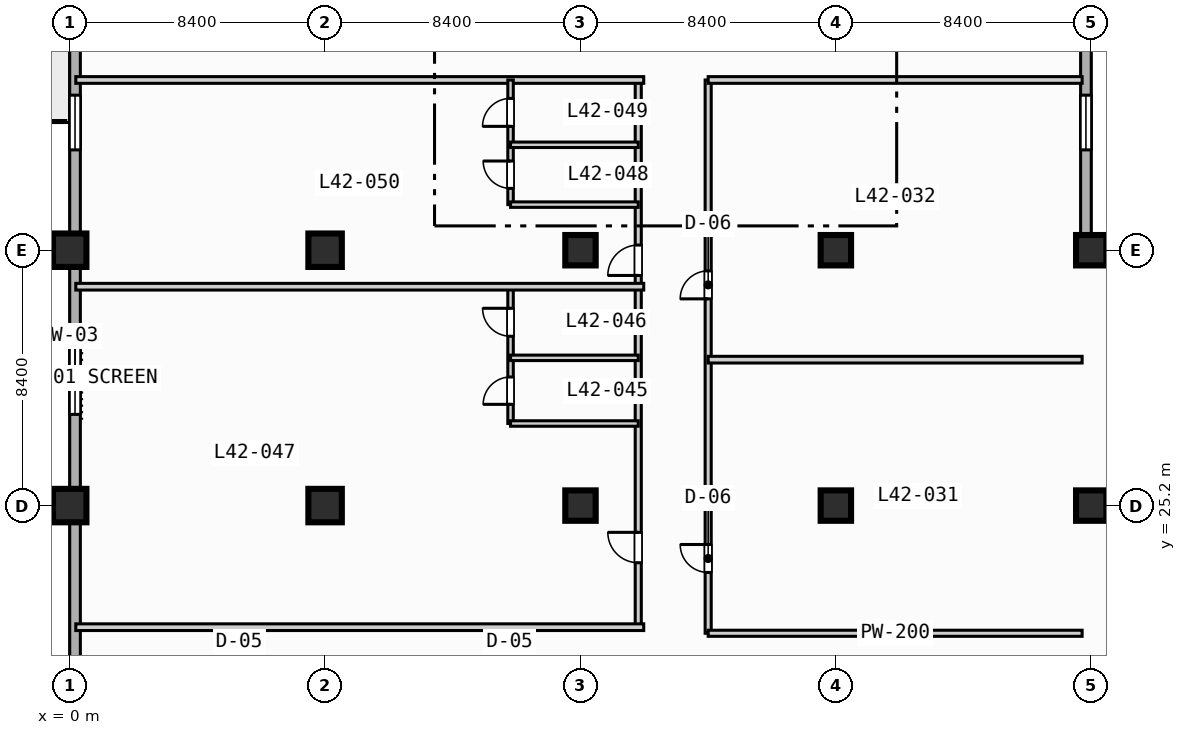
"""IFC4 building model, lengths in metres.
Left out: names, types, materials, properties, quantities, classifications, styles, units other than length and angle.
Written with IfcOpenShell. Run it as: python <this file> out.ifc"""

import sys

from ifc_helpers import new_model, si_unit, direction, frame, frame_2d, origin, origin_2d, place, context, subcontext, project, spatial, rectangle, extrude, element, fill, save


model = new_model("IFC4")
c1 = context("Model", 3, precision=1e-05, world=origin(), true_north=direction((0.0, 1.0)))
c2 = subcontext(c1, "Body", "Model", "MODEL_VIEW")
j1 = project(units=[si_unit("LENGTHUNIT", "METRE"), si_unit("PLANEANGLEUNIT", "RADIAN")], contexts=[c1])
p1 = place(None, origin())
s1 = spatial("IfcSite", under=j1, at=p1, CompositionType="ELEMENT")
p2 = place(p1, origin())
s2 = spatial("IfcBuilding", under=s1, at=p2, CompositionType="ELEMENT")
p3 = place(p2, frame((0.0, 0.0, 175.4)))
s3 = spatial("IfcBuildingStorey", under=s2, at=p3, CompositionType="ELEMENT", Elevation=175.4)
for number, where, z_axis, x_axis in (
    (1, (0.0, 25.2, 0.0), (0.0, 0.0, 1.0), (1.0, 0.0, 0.0)),
    (2, (0.0, 33.6, 0.0), (0.0, 0.0, 1.0), (1.0, 0.0, 0.0)),
    (3, (8.4, 25.2, 0.0), (0.0, 0.0, 1.0), (1.0, 0.0, 0.0)),
    (4, (8.4, 33.6, 0.0), (0.0, 0.0, 1.0), (1.0, 0.0, 0.0)),
):
    element("IfcColumn", number, at=place(p3, frame(where, z_axis=z_axis, x_axis=x_axis)), inside=s3, PredefinedType="COLUMN", context=c2, shape_type="SweptSolid", body=[
        extrude(rectangle(XDim=1.1, YDim=1.1, at=origin_2d()), origin(), (0.0, 0.0, 1.0), 3.7),
    ])
for number, where, z_axis, x_axis in (
    (5, (16.8, 25.2, 0.0), (0.0, 0.0, 1.0), (1.0, 0.0, 0.0)),
    (6, (16.8, 33.6, 0.0), (0.0, 0.0, 1.0), (1.0, 0.0, 0.0)),
    (7, (25.2, 25.2, 0.0), (0.0, 0.0, 1.0), (1.0, 0.0, 0.0)),
    (8, (25.2, 33.6, 0.0), (0.0, 0.0, 1.0), (1.0, 0.0, 0.0)),
    (9, (33.6, 25.2, 0.0), (0.0, 0.0, 1.0), (1.0, 0.0, 0.0)),
    (10, (33.6, 33.6, 0.0), (0.0, 0.0, 1.0), (1.0, 0.0, 0.0)),
):
    element("IfcColumn", number, at=place(p3, frame(where, z_axis=z_axis, x_axis=x_axis)), inside=s3, PredefinedType="COLUMN", context=c2, shape_type="SweptSolid", body=[
        extrude(rectangle(XDim=1.0, YDim=1.0, at=origin_2d()), origin(), (0.0, 0.0, 1.0), 3.7),
    ])
p4 = place(p3, frame((0.175, 3.175, 0.0), z_axis=(0.0, 0.0, 1.0), x_axis=(0.0, 1.0, 0.0)))
e11 = element("IfcWall", 11, at=p4, inside=s3, PredefinedType="STANDARD", context=c2, shape_type="SweptSolid", body=[
    extrude(rectangle(XDim=69.25, YDim=0.35, at=frame_2d((34.625, 0.0))), origin(), (0.0, 0.0, 1.0), 3.47),
])
p5 = place(p4, frame((42.325, 0.0, 0.0)))
e12 = element("IfcOpeningElement", 12, at=p5, cuts=e11, PredefinedType="OPENING", context=c2, shape_type="SweptSolid", body=[
    extrude(rectangle(XDim=1.4, YDim=2.2, at=frame_2d((0.7, 1.1))), frame((0.0, 0.185, 0.0), z_axis=(0.0, -1.0, 0.0), x_axis=(1.0, 0.0, 0.0)), (0.0, 0.0, 1.0), 0.37),
])
p6 = place(p4, frame((25.025, 0.0, 0.85)))
e13 = element("IfcOpeningElement", 13, at=p6, cuts=e11, PredefinedType="OPENING", context=c2, shape_type="SweptSolid", body=[
    extrude(rectangle(XDim=2.4, YDim=1.95, at=frame_2d((1.2, 0.975))), frame((0.0, 0.185, 0.0), z_axis=(0.0, -1.0, 0.0), x_axis=(1.0, 0.0, 0.0)), (0.0, 0.0, 1.0), 0.37),
])
p7 = place(p4, frame((33.725, 0.0, 0.85)))
e14 = element("IfcOpeningElement", 14, at=p7, cuts=e11, PredefinedType="OPENING", context=c2, shape_type="SweptSolid", body=[
    extrude(rectangle(XDim=1.8, YDim=1.8, at=frame_2d((0.9, 0.9))), frame((0.0, 0.185, 0.0), z_axis=(0.0, -1.0, 0.0), x_axis=(1.0, 0.0, 0.0)), (0.0, 0.0, 1.0), 0.37),
])
p8 = place(p4, frame((58.625, 0.0, 0.85)))
e15 = element("IfcOpeningElement", 15, at=p8, cuts=e11, PredefinedType="OPENING", context=c2, shape_type="SweptSolid", body=[
    extrude(rectangle(XDim=2.4, YDim=1.95, at=frame_2d((1.2, 0.975))), frame((0.0, 0.185, 0.0), z_axis=(0.0, -1.0, 0.0), x_axis=(1.0, 0.0, 0.0)), (0.0, 0.0, 1.0), 0.37),
])
p9 = place(p3, frame((33.425, 72.425, 0.0), z_axis=(0.0, 0.0, 1.0), x_axis=(0.0, -1.0, 0.0)))
e16 = element("IfcWall", 16, at=p9, inside=s3, PredefinedType="STANDARD", context=c2, shape_type="SweptSolid", body=[
    extrude(rectangle(XDim=39.0, YDim=0.35, at=frame_2d((19.5, 0.0))), origin(), (0.0, 0.0, 1.0), 3.47),
])
p10 = place(p9, frame((33.725, 0.0, 0.85)))
e17 = element("IfcOpeningElement", 17, at=p10, cuts=e16, PredefinedType="OPENING", context=c2, shape_type="SweptSolid", body=[
    extrude(rectangle(XDim=1.8, YDim=1.8, at=frame_2d((0.9, 0.9))), frame((0.0, 0.185, 0.0), z_axis=(0.0, -1.0, 0.0), x_axis=(1.0, 0.0, 0.0)), (0.0, 0.0, 1.0), 0.37),
])
p11 = place(p9, frame((16.925, 0.0, 0.85)))
e18 = element("IfcOpeningElement", 18, at=p11, cuts=e16, PredefinedType="OPENING", context=c2, shape_type="SweptSolid", body=[
    extrude(rectangle(XDim=1.8, YDim=1.8, at=frame_2d((0.9, 0.9))), frame((0.0, 0.185, 0.0), z_axis=(0.0, -1.0, 0.0), x_axis=(1.0, 0.0, 0.0)), (0.0, 0.0, 1.0), 0.37),
])
p12 = place(p9, frame((8.225, 0.0, 0.85)))
e19 = element("IfcOpeningElement", 19, at=p12, cuts=e16, PredefinedType="OPENING", context=c2, shape_type="SweptSolid", body=[
    extrude(rectangle(XDim=2.4, YDim=1.95, at=frame_2d((1.2, 0.975))), frame((0.0, 0.185, 0.0), z_axis=(0.0, -1.0, 0.0), x_axis=(1.0, 0.0, 0.0)), (0.0, 0.0, 1.0), 0.37),
])
p13 = place(p3, frame((33.425, 33.425, 0.0), z_axis=(0.0, 0.0, 1.0), x_axis=(1.0, 0.0, 0.0)))
e20 = element("IfcWall", 20, at=p13, inside=s3, PredefinedType="STANDARD", context=c2, shape_type="SweptSolid", body=[
    extrude(rectangle(XDim=39.0, YDim=0.35, at=frame_2d((19.5, 0.0))), origin(), (0.0, 0.0, 1.0), 3.47),
])
p14 = place(p13, frame((12.075, 0.0, 0.0)))
e21 = element("IfcOpeningElement", 21, at=p14, cuts=e20, PredefinedType="OPENING", context=c2, shape_type="SweptSolid", body=[
    extrude(rectangle(XDim=1.4, YDim=2.2, at=frame_2d((0.7, 1.1))), frame((0.0, 0.185, 0.0), z_axis=(0.0, -1.0, 0.0), x_axis=(1.0, 0.0, 0.0)), (0.0, 0.0, 1.0), 0.37),
])
p15 = place(p13, frame((20.275, 0.0, 0.85)))
e22 = element("IfcOpeningElement", 22, at=p15, cuts=e20, PredefinedType="OPENING", context=c2, shape_type="SweptSolid", body=[
    extrude(rectangle(XDim=1.8, YDim=1.8, at=frame_2d((0.9, 0.9))), frame((0.0, 0.185, 0.0), z_axis=(0.0, -1.0, 0.0), x_axis=(1.0, 0.0, 0.0)), (0.0, 0.0, 1.0), 0.37),
])
p16 = place(p13, frame((28.375, 0.0, 0.85)))
e23 = element("IfcOpeningElement", 23, at=p16, cuts=e20, PredefinedType="OPENING", context=c2, shape_type="SweptSolid", body=[
    extrude(rectangle(XDim=2.4, YDim=1.95, at=frame_2d((1.2, 0.975))), frame((0.0, 0.185, 0.0), z_axis=(0.0, -1.0, 0.0), x_axis=(1.0, 0.0, 0.0)), (0.0, 0.0, 1.0), 0.37),
])
p17 = place(p3, frame((21.0, 21.0, 0.0), z_axis=(0.0, 0.0, 1.0), x_axis=(0.0, 1.0, 0.0)))
e24 = element("IfcWall", 24, at=p17, inside=s3, PredefinedType="PARTITIONING", context=c2, shape_type="SweptSolid", body=[
    extrude(rectangle(XDim=18.2, YDim=0.2, at=frame_2d((9.1, 0.0))), origin(), (0.0, 0.0, 1.0), 3.47),
])
p18 = place(p17, frame((2.0, 0.0, 0.0)))
e25 = element("IfcOpeningElement", 25, at=p18, cuts=e24, PredefinedType="OPENING", context=c2, shape_type="SweptSolid", body=[
    extrude(rectangle(XDim=0.92, YDim=2.1, at=frame_2d((0.46, 1.05))), frame((0.0, 0.11, 0.0), z_axis=(0.0, -1.0, 0.0), x_axis=(1.0, 0.0, 0.0)), (0.0, 0.0, 1.0), 0.22),
])
p19 = place(p17, frame((11.0, 0.0, 0.0)))
e26 = element("IfcOpeningElement", 26, at=p19, cuts=e24, PredefinedType="OPENING", context=c2, shape_type="SweptSolid", body=[
    extrude(rectangle(XDim=0.92, YDim=2.1, at=frame_2d((0.46, 1.05))), frame((0.0, 0.11, 0.0), z_axis=(0.0, -1.0, 0.0), x_axis=(1.0, 0.0, 0.0)), (0.0, 0.0, 1.0), 0.22),
])
p20 = place(p3, frame((21.0, 21.0, 0.0), z_axis=(0.0, 0.0, 1.0), x_axis=(1.0, 0.0, 0.0)))
e27 = element("IfcWall", 27, at=p20, inside=s3, PredefinedType="PARTITIONING", context=c2, shape_type="SweptSolid", body=[
    extrude(rectangle(XDim=12.3, YDim=0.2, at=frame_2d((6.15, 0.0))), origin(), (0.0, 0.0, 1.0), 3.47),
])
for number, where, z_axis, x_axis in (
    (28, (21.0, 30.0, 0.0), (0.0, 0.0, 1.0), (1.0, 0.0, 0.0)),
    (29, (21.0, 39.2, 0.0), (0.0, 0.0, 1.0), (1.0, 0.0, 0.0)),
):
    element("IfcWall", number, at=place(p3, frame(where, z_axis=z_axis, x_axis=x_axis)), inside=s3, PredefinedType="PARTITIONING", context=c2, shape_type="SweptSolid", body=[
        extrude(rectangle(XDim=12.3, YDim=0.22, at=frame_2d((6.15, 0.0))), origin(), (0.0, 0.0, 1.0), 3.47),
    ])
p21 = place(p3, frame((18.7, 21.2, 0.0), z_axis=(0.0, 0.0, 1.0), x_axis=(0.0, 1.0, 0.0)))
e30 = element("IfcWall", 30, at=p21, inside=s3, PredefinedType="PARTITIONING", context=c2, shape_type="SweptSolid", body=[
    extrude(rectangle(XDim=18.0, YDim=0.2, at=frame_2d((9.0, 0.0))), origin(), (0.0, 0.0, 1.0), 3.47),
])
p22 = place(p21, frame((2.12, 0.0, 0.0)))
e31 = element("IfcOpeningElement", 31, at=p22, cuts=e30, PredefinedType="OPENING", context=c2, shape_type="SweptSolid", body=[
    extrude(rectangle(XDim=1.0, YDim=2.15, at=frame_2d((0.5, 1.075))), frame((0.0, 0.11, 0.0), z_axis=(0.0, -1.0, 0.0), x_axis=(1.0, 0.0, 0.0)), (0.0, 0.0, 1.0), 0.22),
])
p23 = place(p21, frame((11.57, 0.0, 0.0)))
e32 = element("IfcOpeningElement", 32, at=p23, cuts=e30, PredefinedType="OPENING", context=c2, shape_type="SweptSolid", body=[
    extrude(rectangle(XDim=1.0, YDim=2.15, at=frame_2d((0.5, 1.075))), frame((0.0, 0.11, 0.0), z_axis=(0.0, -1.0, 0.0), x_axis=(1.0, 0.0, 0.0)), (0.0, 0.0, 1.0), 0.22),
])
p24 = place(p3, frame((0.2, 21.2, 0.0), z_axis=(0.0, 0.0, 1.0), x_axis=(1.0, 0.0, 0.0)))
e33 = element("IfcWall", 33, at=p24, inside=s3, PredefinedType="PARTITIONING", context=c2, shape_type="SweptSolid", body=[
    extrude(rectangle(XDim=18.68, YDim=0.22, at=frame_2d((9.34, 0.0))), origin(), (0.0, 0.0, 1.0), 3.47),
])
p25 = place(p3, frame((14.5, 27.9, 0.0), z_axis=(0.0, 0.0, 1.0), x_axis=(0.0, 1.0, 0.0)))
e34 = element("IfcWall", 34, at=p25, inside=s3, PredefinedType="PLUMBINGWALL", context=c2, shape_type="SweptSolid", body=[
    extrude(rectangle(XDim=4.5, YDim=0.18, at=frame_2d((2.25, 0.0))), origin(), (0.0, 0.0, 1.0), 3.47),
])
p26 = place(p25, frame((0.63, 0.0, 0.0)))
e35 = element("IfcOpeningElement", 35, at=p26, cuts=e34, PredefinedType="OPENING", context=c2, shape_type="SweptSolid", body=[
    extrude(rectangle(XDim=0.9, YDim=2.1, at=frame_2d((0.45, 1.05))), frame((0.0, 0.1, 0.0), z_axis=(0.0, -1.0, 0.0), x_axis=(1.0, 0.0, 0.0)), (0.0, 0.0, 1.0), 0.2),
])
p27 = place(p25, frame((2.87, 0.0, 0.0)))
e36 = element("IfcOpeningElement", 36, at=p27, cuts=e34, PredefinedType="OPENING", context=c2, shape_type="SweptSolid", body=[
    extrude(rectangle(XDim=0.92, YDim=2.1, at=frame_2d((0.46, 1.05))), frame((0.0, 0.1, 0.0), z_axis=(0.0, -1.0, 0.0), x_axis=(1.0, 0.0, 0.0)), (0.0, 0.0, 1.0), 0.2),
])
for number, where, z_axis, x_axis in (
    (37, (14.5, 27.9, 0.0), (0.0, 0.0, 1.0), (1.0, 0.0, 0.0)),
    (38, (14.5, 30.06, 0.0), (0.0, 0.0, 1.0), (1.0, 0.0, 0.0)),
):
    element("IfcWall", number, at=place(p3, frame(where, z_axis=z_axis, x_axis=x_axis)), inside=s3, PredefinedType="PLUMBINGWALL", context=c2, shape_type="SweptSolid", body=[
        extrude(rectangle(XDim=4.2, YDim=0.18, at=frame_2d((2.1, 0.0))), origin(), (0.0, 0.0, 1.0), 3.47),
    ])
for number, where, z_axis, x_axis in (
    (39, (0.2, 32.4, 0.0), (0.0, 0.0, 1.0), (1.0, 0.0, 0.0)),
    (40, (0.2, 39.2, 0.0), (0.0, 0.0, 1.0), (1.0, 0.0, 0.0)),
):
    element("IfcWall", number, at=place(p3, frame(where, z_axis=z_axis, x_axis=x_axis)), inside=s3, PredefinedType="PARTITIONING", context=c2, shape_type="SweptSolid", body=[
        extrude(rectangle(XDim=18.68, YDim=0.22, at=frame_2d((9.34, 0.0))), origin(), (0.0, 0.0, 1.0), 3.47),
    ])
p28 = place(p3, frame((14.5, 35.1, 0.0), z_axis=(0.0, 0.0, 1.0), x_axis=(0.0, 1.0, 0.0)))
e41 = element("IfcWall", 41, at=p28, inside=s3, PredefinedType="PLUMBINGWALL", context=c2, shape_type="SweptSolid", body=[
    extrude(rectangle(XDim=4.1, YDim=0.18, at=frame_2d((2.05, 0.0))), origin(), (0.0, 0.0, 1.0), 3.47),
])
p29 = place(p28, frame((0.534, 0.0, 0.0)))
e42 = element("IfcOpeningElement", 42, at=p29, cuts=e41, PredefinedType="OPENING", context=c2, shape_type="SweptSolid", body=[
    extrude(rectangle(XDim=0.9, YDim=2.1, at=frame_2d((0.45, 1.05))), frame((0.0, 0.1, 0.0), z_axis=(0.0, -1.0, 0.0), x_axis=(1.0, 0.0, 0.0)), (0.0, 0.0, 1.0), 0.2),
])
p30 = place(p28, frame((2.574, 0.0, 0.0)))
e43 = element("IfcOpeningElement", 43, at=p30, cuts=e41, PredefinedType="OPENING", context=c2, shape_type="SweptSolid", body=[
    extrude(rectangle(XDim=0.92, YDim=2.1, at=frame_2d((0.46, 1.05))), frame((0.0, 0.1, 0.0), z_axis=(0.0, -1.0, 0.0), x_axis=(1.0, 0.0, 0.0)), (0.0, 0.0, 1.0), 0.2),
])
for number, where, z_axis, x_axis in (
    (44, (14.5, 35.1, 0.0), (0.0, 0.0, 1.0), (1.0, 0.0, 0.0)),
    (45, (14.5, 37.068, 0.0), (0.0, 0.0, 1.0), (1.0, 0.0, 0.0)),
):
    element("IfcWall", number, at=place(p3, frame(where, z_axis=z_axis, x_axis=x_axis)), inside=s3, PredefinedType="PLUMBINGWALL", context=c2, shape_type="SweptSolid", body=[
        extrude(rectangle(XDim=4.2, YDim=0.18, at=frame_2d((2.1, 0.0))), origin(), (0.0, 0.0, 1.0), 3.47),
    ])
p31 = place(p6, origin())
e46 = element("IfcWindow", 46, at=p31, inside=s3, PartitioningType="SINGLE_PANEL", PredefinedType="WINDOW", context=c2, shape_type="SweptSolid", body=[
    extrude(rectangle(XDim=2.4, YDim=1.95, at=frame_2d((1.2, 0.975))), frame((0.0, 0.03, 0.0), z_axis=(0.0, -1.0, 0.0), x_axis=(1.0, 0.0, 0.0)), (0.0, 0.0, 1.0), 0.06),
])
fill(e13, e46)
p32 = place(p7, origin())
e47 = element("IfcWindow", 47, at=p32, inside=s3, PartitioningType="SINGLE_PANEL", PredefinedType="WINDOW", context=c2, shape_type="SweptSolid", body=[
    extrude(rectangle(XDim=1.8, YDim=1.8, at=frame_2d((0.9, 0.9))), frame((0.0, 0.03, 0.0), z_axis=(0.0, -1.0, 0.0), x_axis=(1.0, 0.0, 0.0)), (0.0, 0.0, 1.0), 0.06),
])
fill(e14, e47)
p33 = place(p10, origin())
e48 = element("IfcWindow", 48, at=p33, inside=s3, PartitioningType="SINGLE_PANEL", PredefinedType="WINDOW", context=c2, shape_type="SweptSolid", body=[
    extrude(rectangle(XDim=1.8, YDim=1.8, at=frame_2d((0.9, 0.9))), frame((0.0, 0.03, 0.0), z_axis=(0.0, -1.0, 0.0), x_axis=(1.0, 0.0, 0.0)), (0.0, 0.0, 1.0), 0.06),
])
fill(e17, e48)
p34 = place(p18, origin())
e49 = element("IfcDoor", 49, at=p34, inside=s3, OperationType="SINGLE_SWING_RIGHT", PredefinedType="DOOR", context=c2, shape_type="SweptSolid", body=[
    extrude(rectangle(XDim=0.92, YDim=2.1, at=frame_2d((0.46, 1.05))), frame((0.0, 0.025, 0.0), z_axis=(0.0, -1.0, 0.0), x_axis=(1.0, 0.0, 0.0)), (0.0, 0.0, 1.0), 0.05),
])
fill(e25, e49)
p35 = place(p19, origin())
e50 = element("IfcDoor", 50, at=p35, inside=s3, OperationType="SINGLE_SWING_LEFT", PredefinedType="DOOR", context=c2, shape_type="SweptSolid", body=[
    extrude(rectangle(XDim=0.92, YDim=2.1, at=frame_2d((0.46, 1.05))), frame((0.0, 0.025, 0.0), z_axis=(0.0, -1.0, 0.0), x_axis=(1.0, 0.0, 0.0)), (0.0, 0.0, 1.0), 0.05),
])
fill(e26, e50)
p36 = place(p22, origin())
e51 = element("IfcDoor", 51, at=p36, inside=s3, OperationType="SINGLE_SWING_RIGHT", PredefinedType="DOOR", context=c2, shape_type="SweptSolid", body=[
    extrude(rectangle(XDim=1.0, YDim=2.15, at=frame_2d((0.5, 1.075))), frame((0.0, 0.025, 0.0), z_axis=(0.0, -1.0, 0.0), x_axis=(1.0, 0.0, 0.0)), (0.0, 0.0, 1.0), 0.05),
])
fill(e31, e51)
p37 = place(p23, origin())
e52 = element("IfcDoor", 52, at=p37, inside=s3, OperationType="SINGLE_SWING_LEFT", PredefinedType="DOOR", context=c2, shape_type="SweptSolid", body=[
    extrude(rectangle(XDim=1.0, YDim=2.15, at=frame_2d((0.5, 1.075))), frame((0.0, 0.025, 0.0), z_axis=(0.0, -1.0, 0.0), x_axis=(1.0, 0.0, 0.0)), (0.0, 0.0, 1.0), 0.05),
])
fill(e32, e52)
p38 = place(p26, origin())
e53 = element("IfcDoor", 53, at=p38, inside=s3, OperationType="SINGLE_SWING_LEFT", PredefinedType="DOOR", context=c2, shape_type="SweptSolid", body=[
    extrude(rectangle(XDim=0.9, YDim=2.1, at=frame_2d((0.45, 1.05))), frame((0.0, 0.025, 0.0), z_axis=(0.0, -1.0, 0.0), x_axis=(1.0, 0.0, 0.0)), (0.0, 0.0, 1.0), 0.05),
])
fill(e35, e53)
p39 = place(p27, origin())
e54 = element("IfcDoor", 54, at=p39, inside=s3, OperationType="SINGLE_SWING_RIGHT", PredefinedType="DOOR", context=c2, shape_type="SweptSolid", body=[
    extrude(rectangle(XDim=0.92, YDim=2.1, at=frame_2d((0.46, 1.05))), frame((0.0, 0.025, 0.0), z_axis=(0.0, -1.0, 0.0), x_axis=(1.0, 0.0, 0.0)), (0.0, 0.0, 1.0), 0.05),
])
fill(e36, e54)
p40 = place(p29, origin())
e55 = element("IfcDoor", 55, at=p40, inside=s3, OperationType="SINGLE_SWING_RIGHT", PredefinedType="DOOR", context=c2, shape_type="SweptSolid", body=[
    extrude(rectangle(XDim=0.9, YDim=2.1, at=frame_2d((0.45, 1.05))), frame((0.0, 0.025, 0.0), z_axis=(0.0, -1.0, 0.0), x_axis=(1.0, 0.0, 0.0)), (0.0, 0.0, 1.0), 0.05),
])
fill(e42, e55)
p41 = place(p30, origin())
e56 = element("IfcDoor", 56, at=p41, inside=s3, OperationType="SINGLE_SWING_LEFT", PredefinedType="DOOR", context=c2, shape_type="SweptSolid", body=[
    extrude(rectangle(XDim=0.92, YDim=2.1, at=frame_2d((0.46, 1.05))), frame((0.0, 0.025, 0.0), z_axis=(0.0, -1.0, 0.0), x_axis=(1.0, 0.0, 0.0)), (0.0, 0.0, 1.0), 0.05),
])
fill(e43, e56)
save(model, sys.argv[1])
